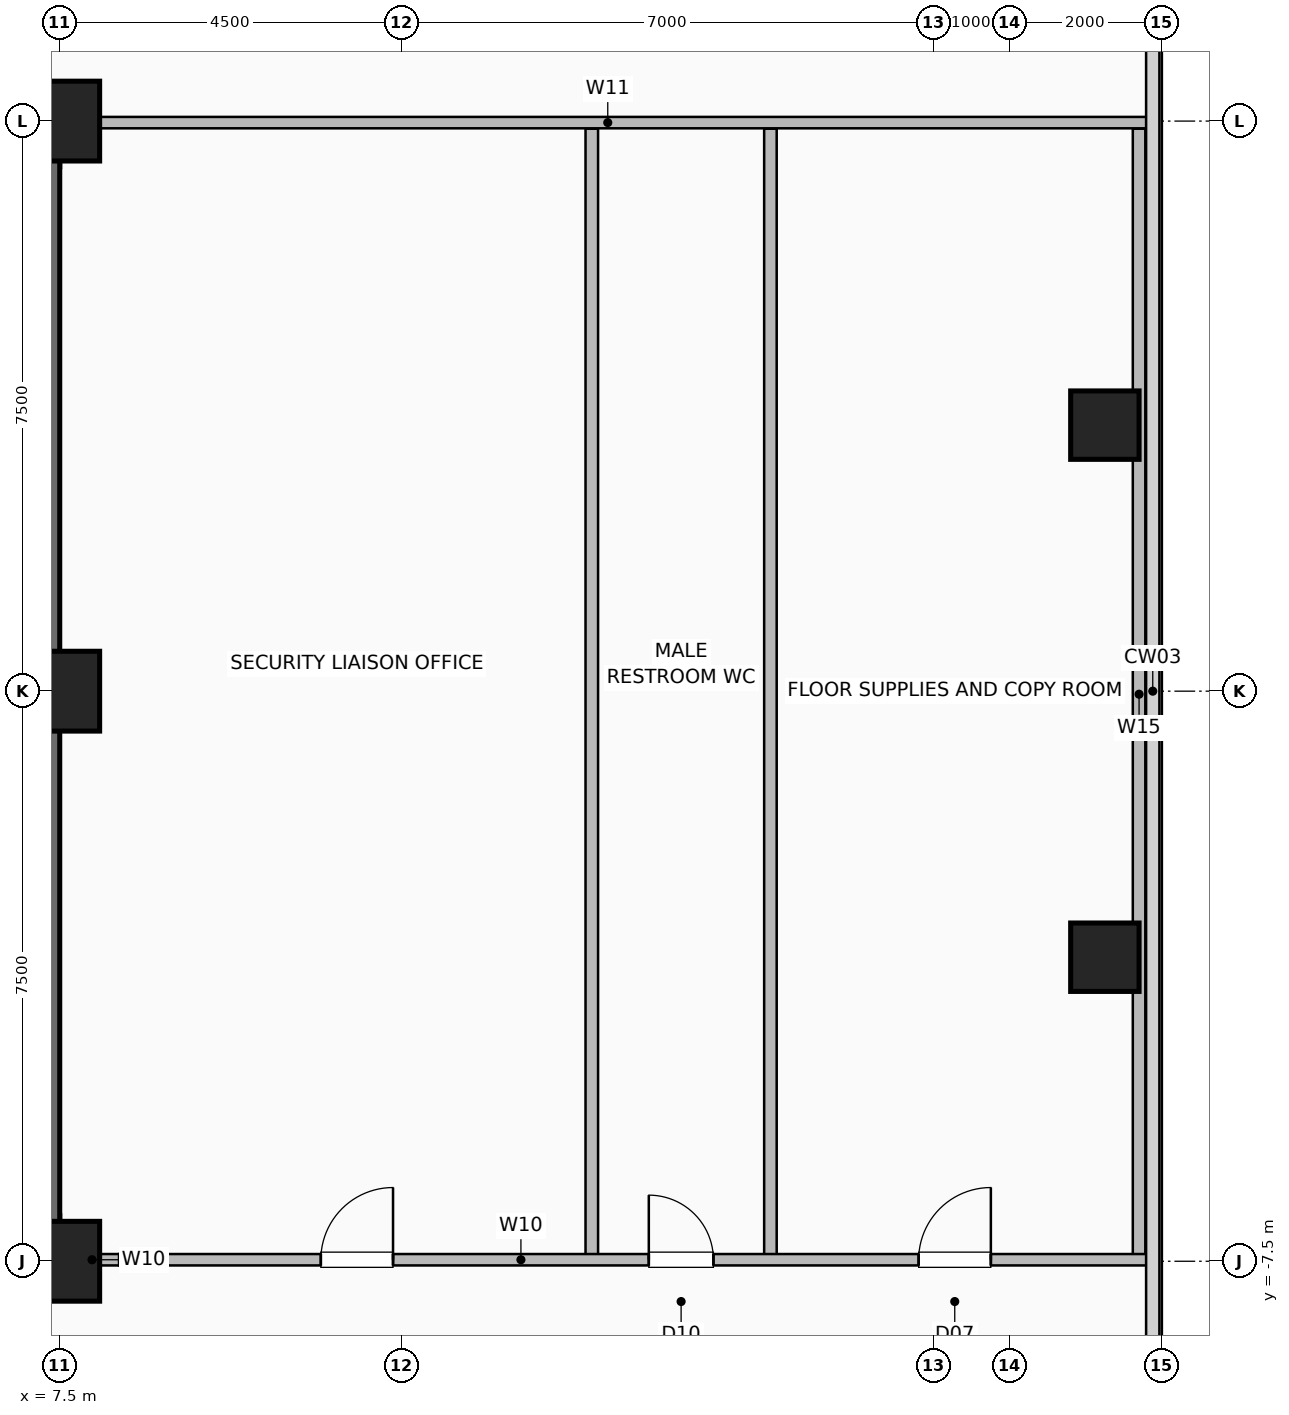
"""IFC4 building model, lengths in metres.
Left out: names, types, materials, properties, quantities, classifications, styles, units other than length and angle.
Written with IfcOpenShell. Run it as: python <this file> out.ifc"""

import sys

from ifc_helpers import new_model, si_unit, direction, frame, frame_2d, origin, origin_2d, place, context, subcontext, project, spatial, rectangle, hollow_rectangle, extrude, element, fill, save


model = new_model("IFC4")
c1 = context("Model", 3, precision=1e-05, world=origin(), true_north=direction((0.0, 1.0)))
c2 = subcontext(c1, "Body", "Model", "MODEL_VIEW")
j1 = project(units=[si_unit("LENGTHUNIT", "METRE"), si_unit("PLANEANGLEUNIT", "RADIAN")], contexts=[c1])
p1 = place(None, origin())
s1 = spatial("IfcSite", under=j1, at=p1, CompositionType="ELEMENT")
p2 = place(p1, origin())
s2 = spatial("IfcBuilding", under=s1, at=p2, CompositionType="ELEMENT")
p3 = place(p2, frame((0.0, 0.0, 151.6)))
s3 = spatial("IfcBuildingStorey", under=s2, at=p3, CompositionType="ELEMENT", Elevation=151.6)
for number, where, z_axis, x_axis in (
    (1, (7.5, -7.5, 0.0), (0.0, 0.0, 1.0), (1.0, 0.0, 0.0)),
    (2, (7.5, 0.0, 0.0), (0.0, 0.0, 1.0), (1.0, 0.0, 0.0)),
    (3, (7.5, 7.5, 0.0), (0.0, 0.0, 1.0), (1.0, 0.0, 0.0)),
):
    element("IfcColumn", number, at=place(p3, frame(where, z_axis=z_axis, x_axis=x_axis)), inside=s3, PredefinedType="COLUMN", context=c2, shape_type="SweptSolid", body=[
        extrude(hollow_rectangle(XDim=1.05, YDim=1.05, WallThickness=0.05, at=origin_2d()), origin(), (0.0, 0.0, 1.0), 3.6),
    ])
for number, where, z_axis, x_axis in (
    (4, (21.25, -3.5, 0.0), (0.0, 0.0, 1.0), (1.0, 0.0, 0.0)),
    (5, (21.25, 3.5, 0.0), (0.0, 0.0, 1.0), (1.0, 0.0, 0.0)),
):
    element("IfcColumn", number, at=place(p3, frame(where, z_axis=z_axis, x_axis=x_axis)), inside=s3, PredefinedType="COLUMN", context=c2, shape_type="SweptSolid", body=[
        extrude(hollow_rectangle(XDim=0.9, YDim=0.9, WallThickness=0.045, at=origin_2d()), origin(), (0.0, 0.0, 1.0), 3.6),
    ])
p4 = place(p3, frame((-7.5, -7.2, 0.0), z_axis=(0.0, 0.0, 1.0), x_axis=(1.0, 0.0, 0.0)))
e6 = element("IfcWall", 6, at=p4, inside=s3, PredefinedType="SHEAR", context=c2, shape_type="SweptSolid", body=[
    extrude(rectangle(XDim=15.0, YDim=0.6, at=frame_2d((7.5, 0.0))), origin(), (0.0, 0.0, 1.0), 3.25),
])
p5 = place(p4, frame((1.55, 0.0, 0.0)))
e7 = element("IfcOpeningElement", 7, at=p5, cuts=e6, PredefinedType="OPENING", context=c2, shape_type="SweptSolid", body=[
    extrude(rectangle(XDim=1.05, YDim=2.08, at=frame_2d((0.525, 1.04))), frame((0.0, 0.31, 0.0), z_axis=(0.0, -1.0, 0.0), x_axis=(1.0, 0.0, 0.0)), (0.0, 0.0, 1.0), 0.62),
])
p6 = place(p4, frame((12.4, 0.0, 0.0)))
e8 = element("IfcOpeningElement", 8, at=p6, cuts=e6, PredefinedType="OPENING", context=c2, shape_type="SweptSolid", body=[
    extrude(rectangle(XDim=1.05, YDim=2.08, at=frame_2d((0.525, 1.04))), frame((0.0, 0.31, 0.0), z_axis=(0.0, -1.0, 0.0), x_axis=(1.0, 0.0, 0.0)), (0.0, 0.0, 1.0), 0.62),
])
p7 = place(p4, frame((5.2, 0.0, 0.0)))
e9 = element("IfcOpeningElement", 9, at=p7, cuts=e6, PredefinedType="OPENING", context=c2, shape_type="SweptSolid", body=[
    extrude(rectangle(XDim=1.0, YDim=2.08, at=frame_2d((0.5, 1.04))), frame((0.0, 0.31, 0.0), z_axis=(0.0, -1.0, 0.0), x_axis=(1.0, 0.0, 0.0)), (0.0, 0.0, 1.0), 0.62),
])
p8 = place(p4, frame((8.65, 0.0, 0.0)))
e10 = element("IfcOpeningElement", 10, at=p8, cuts=e6, PredefinedType="OPENING", context=c2, shape_type="SweptSolid", body=[
    extrude(rectangle(XDim=1.0, YDim=2.08, at=frame_2d((0.5, 1.04))), frame((0.0, 0.31, 0.0), z_axis=(0.0, -1.0, 0.0), x_axis=(1.0, 0.0, 0.0)), (0.0, 0.0, 1.0), 0.62),
])
for number, where, z_axis, x_axis in (
    (11, (-7.5, 7.2, 0.0), (0.0, 0.0, 1.0), (1.0, 0.0, 0.0)),
    (12, (7.2, -7.5, 0.0), (0.0, 0.0, 1.0), (0.0, 1.0, 0.0)),
):
    element("IfcWall", number, at=place(p3, frame(where, z_axis=z_axis, x_axis=x_axis)), inside=s3, PredefinedType="SHEAR", context=c2, shape_type="SweptSolid", body=[
        extrude(rectangle(XDim=15.0, YDim=0.6, at=frame_2d((7.5, 0.0))), origin(), (0.0, 0.0, 1.0), 3.25),
    ])
p9 = place(p3, frame((7.45, -7.48, 0.0), z_axis=(0.0, 0.0, 1.0), x_axis=(1.0, 0.0, 0.0)))
e13 = element("IfcWall", 13, at=p9, inside=s3, PredefinedType="PARTITIONING", context=c2, shape_type="SweptSolid", body=[
    extrude(rectangle(XDim=0.95, YDim=0.15, at=frame_2d((0.475, 0.0))), origin(), (0.0, 0.0, 1.0), 3.25),
])
for number, where, z_axis, x_axis in (
    (14, (16.85, -7.48, 0.0), (0.0, 0.0, 1.0), (0.0, 1.0, 0.0)),
    (15, (14.5, -7.48, 0.0), (0.0, 0.0, 1.0), (0.0, 1.0, 0.0)),
    (16, (21.7, -7.48, 0.0), (0.0, 0.0, 1.0), (0.0, 1.0, 0.0)),
):
    element("IfcWall", number, at=place(p3, frame(where, z_axis=z_axis, x_axis=x_axis)), inside=s3, PredefinedType="PLUMBINGWALL", context=c2, shape_type="SweptSolid", body=[
        extrude(rectangle(XDim=14.88, YDim=0.165, at=frame_2d((7.44, 0.0))), origin(), (0.0, 0.0, 1.0), 3.25),
    ])
p10 = place(p3, frame((8.28, -7.48, 0.0), z_axis=(0.0, 0.0, 1.0), x_axis=(1.0, 0.0, 0.0)))
e17 = element("IfcWall", 17, at=p10, inside=s3, PredefinedType="PARTITIONING", context=c2, shape_type="SweptSolid", body=[
    extrude(rectangle(XDim=13.54, YDim=0.15, at=frame_2d((6.77, 0.0))), origin(), (0.0, 0.0, 1.0), 3.25),
])
p11 = place(p10, frame((2.655, 0.0, 0.0)))
e18 = element("IfcOpeningElement", 18, at=p11, cuts=e17, PredefinedType="OPENING", context=c2, shape_type="SweptSolid", body=[
    extrude(rectangle(XDim=0.95, YDim=2.06, at=frame_2d((0.475, 1.03))), frame((0.0, 0.085, 0.0), z_axis=(0.0, -1.0, 0.0), x_axis=(1.0, 0.0, 0.0)), (0.0, 0.0, 1.0), 0.17),
])
p12 = place(p10, frame((6.97, 0.0, 0.0)))
e19 = element("IfcOpeningElement", 19, at=p12, cuts=e17, PredefinedType="OPENING", context=c2, shape_type="SweptSolid", body=[
    extrude(rectangle(XDim=0.85, YDim=2.05, at=frame_2d((0.425, 1.025))), frame((0.0, 0.085, 0.0), z_axis=(0.0, -1.0, 0.0), x_axis=(1.0, 0.0, 0.0)), (0.0, 0.0, 1.0), 0.17),
])
p13 = place(p10, frame((10.52, 0.0, 0.0)))
e20 = element("IfcOpeningElement", 20, at=p13, cuts=e17, PredefinedType="OPENING", context=c2, shape_type="SweptSolid", body=[
    extrude(rectangle(XDim=0.95, YDim=2.06, at=frame_2d((0.475, 1.03))), frame((0.0, 0.085, 0.0), z_axis=(0.0, -1.0, 0.0), x_axis=(1.0, 0.0, 0.0)), (0.0, 0.0, 1.0), 0.17),
])
p14 = place(p3, frame((7.6, 7.48, 0.0), z_axis=(0.0, 0.0, 1.0), x_axis=(1.0, 0.0, 0.0)))
e21 = element("IfcWall", 21, at=p14, inside=s3, PredefinedType="PARTITIONING", context=c2, shape_type="SweptSolid", body=[
    extrude(rectangle(XDim=14.22, YDim=0.15, at=frame_2d((7.11, 0.0))), origin(), (0.0, 0.0, 1.0), 3.25),
])
p15 = place(p11, origin())
e22 = element("IfcDoor", 22, at=p15, inside=s3, OperationType="SINGLE_SWING_RIGHT", PredefinedType="DOOR", context=c2, shape_type="SweptSolid", body=[
    extrude(rectangle(XDim=0.95, YDim=2.06, at=frame_2d((0.475, 1.03))), frame((0.0, 0.025, 0.0), z_axis=(0.0, -1.0, 0.0), x_axis=(1.0, 0.0, 0.0)), (0.0, 0.0, 1.0), 0.05),
])
fill(e18, e22)
p16 = place(p12, origin())
e23 = element("IfcDoor", 23, at=p16, inside=s3, OperationType="SINGLE_SWING_LEFT", PredefinedType="DOOR", context=c2, shape_type="SweptSolid", body=[
    extrude(rectangle(XDim=0.85, YDim=2.05, at=frame_2d((0.425, 1.025))), frame((0.0, 0.025, 0.0), z_axis=(0.0, -1.0, 0.0), x_axis=(1.0, 0.0, 0.0)), (0.0, 0.0, 1.0), 0.05),
])
fill(e19, e23)
p17 = place(p13, origin())
e24 = element("IfcDoor", 24, at=p17, inside=s3, OperationType="SINGLE_SWING_RIGHT", PredefinedType="DOOR", context=c2, shape_type="SweptSolid", body=[
    extrude(rectangle(XDim=0.95, YDim=2.06, at=frame_2d((0.475, 1.03))), frame((0.0, 0.025, 0.0), z_axis=(0.0, -1.0, 0.0), x_axis=(1.0, 0.0, 0.0)), (0.0, 0.0, 1.0), 0.05),
])
fill(e20, e24)
save(model, sys.argv[1])
